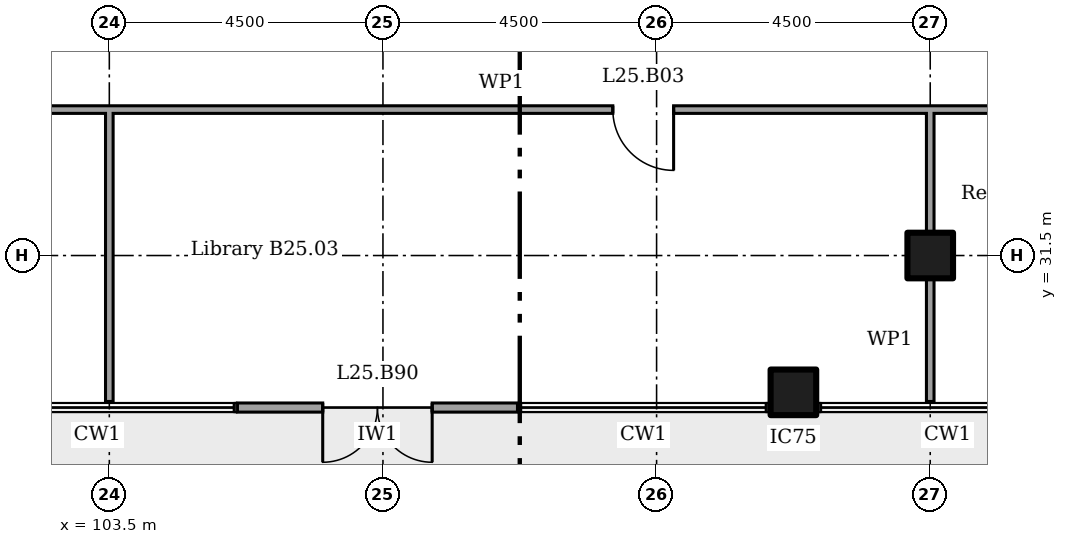
"""IFC4 building model, lengths in metres.
Left out: names, types, materials, properties, quantities, classifications, styles, units other than length and angle.
Written with IfcOpenShell. Run it as: python <this file> out.ifc"""

import sys

from ifc_helpers import new_model, si_unit, direction, frame, frame_2d, origin, origin_2d, place, context, subcontext, project, spatial, rectangle, extrude, element, fill, save


model = new_model("IFC4")
c1 = context("Model", 3, precision=1e-05, world=origin(), true_north=direction((0.0, 1.0)))
c2 = subcontext(c1, "Body", "Model", "MODEL_VIEW")
j1 = project(units=[si_unit("LENGTHUNIT", "METRE"), si_unit("PLANEANGLEUNIT", "RADIAN")], contexts=[c1])
p1 = place(None, origin())
s1 = spatial("IfcSite", under=j1, at=p1, CompositionType="ELEMENT")
p2 = place(p1, origin())
s2 = spatial("IfcBuilding", under=s1, at=p2, CompositionType="ELEMENT")
p3 = place(p2, frame((0.0, 0.0, 102.8)))
s3 = spatial("IfcBuildingStorey", under=s2, at=p3, CompositionType="ELEMENT", Elevation=102.8)
for number, where in (
    (1, (114.75, 29.25, 0.0)),
    (2, (117.0, 31.5, 0.0)),
):
    element("IfcColumn", number, at=place(p3, frame(where)), inside=s3, PredefinedType="COLUMN", context=c2, shape_type="SweptSolid", body=[
        extrude(rectangle(XDim=0.75, YDim=0.75, at=origin_2d()), origin(), (0.0, 0.0, 1.0), 3.6),
    ])
p4 = place(p3, frame((105.606, 29.0, 0.0)))
e3 = element("IfcWall", 3, at=p4, inside=s3, PredefinedType="SOLIDWALL", context=c2, shape_type="SweptSolid", body=[
    extrude(rectangle(XDim=4.606, YDim=0.15, at=frame_2d((2.303, 0.0))), origin(), (0.0, 0.0, 1.0), 3.45),
])
p5 = place(p4, frame((1.403, 0.0, 0.0)))
e4 = element("IfcOpeningElement", 4, at=p5, cuts=e3, PredefinedType="OPENING", context=c2, shape_type="SweptSolid", body=[
    extrude(rectangle(XDim=1.8, YDim=2.4, at=frame_2d((0.9, 1.2))), frame((0.0, 0.085, 0.0), z_axis=(0.0, -1.0, 0.0), x_axis=(1.0, 0.0, 0.0)), (0.0, 0.0, 1.0), 0.17),
])
p6 = place(p3, frame((99.837, 33.9, 0.0)))
e5 = element("IfcWall", 5, at=p6, inside=s3, PredefinedType="PARTITIONING", context=c2, shape_type="SweptSolid", body=[
    extrude(rectangle(XDim=20.225, YDim=0.125, at=frame_2d((10.113, 0.0))), origin(), (0.0, 0.0, 1.0), 3.45),
])
p7 = place(p6, frame((1.47, 0.0, 0.0)))
e6 = element("IfcOpeningElement", 6, at=p7, cuts=e5, PredefinedType="OPENING", context=c2, shape_type="SweptSolid", body=[
    extrude(rectangle(XDim=1.0, YDim=2.1, at=frame_2d((0.5, 1.05))), frame((0.0, 0.073, 0.0), z_axis=(0.0, -1.0, 0.0), x_axis=(1.0, 0.0, 0.0)), (0.0, 0.0, 1.0), 0.145),
])
p8 = place(p6, frame((11.942, 0.0, 0.0)))
e7 = element("IfcOpeningElement", 7, at=p8, cuts=e5, PredefinedType="OPENING", context=c2, shape_type="SweptSolid", body=[
    extrude(rectangle(XDim=1.0, YDim=2.1, at=frame_2d((0.5, 1.05))), frame((0.0, 0.073, 0.0), z_axis=(0.0, -1.0, 0.0), x_axis=(1.0, 0.0, 0.0)), (0.0, 0.0, 1.0), 0.145),
])
p9 = place(p3, frame((103.5, 29.1, 0.0), z_axis=(0.0, 0.0, 1.0), x_axis=(0.0, 1.0, 0.0)))
e8 = element("IfcWall", 8, at=p9, inside=s3, PredefinedType="PARTITIONING", context=c2, shape_type="SweptSolid", body=[
    extrude(rectangle(XDim=4.8, YDim=0.125, at=frame_2d((2.4, 0.0))), origin(), (0.0, 0.0, 1.0), 2.851),
])
for number, where, z_axis, x_axis in (
    (9, (117.0, 29.1, 0.0), (0.0, 0.0, 1.0), (0.0, 1.0, 0.0)),
    (10, (117.0, 31.875, 0.0), (0.0, 0.0, 1.0), (0.0, 1.0, 0.0)),
):
    element("IfcWall", number, at=place(p3, frame(where, z_axis=z_axis, x_axis=x_axis)), inside=s3, PredefinedType="PARTITIONING", context=c2, shape_type="SweptSolid", body=[
        extrude(rectangle(XDim=2.025, YDim=0.125, at=frame_2d((1.012, 0.0))), origin(), (0.0, 0.0, 1.0), 2.842),
    ])
p10 = place(p5, frame((1.8, 0.0, 0.0), x_axis=(-1.0, 0.0, 0.0)))
e11 = element("IfcDoor", 11, at=p10, inside=s3, OperationType="DOUBLE_DOOR_DOUBLE_SWING", PredefinedType="NOTDEFINED", context=c2, shape_type="SweptSolid", body=[
    extrude(rectangle(XDim=1.8, YDim=2.4, at=frame_2d((0.9, 1.2))), frame((0.0, 0.025, 0.0), z_axis=(0.0, -1.0, 0.0), x_axis=(1.0, 0.0, 0.0)), (0.0, 0.0, 1.0), 0.05),
])
fill(e4, e11)
p11 = place(p8, frame((1.0, 0.0, 0.0), x_axis=(-1.0, 0.0, 0.0)))
e12 = element("IfcDoor", 12, at=p11, inside=s3, OperationType="SINGLE_SWING_RIGHT", PredefinedType="DOOR", context=c2, shape_type="SweptSolid", body=[
    extrude(rectangle(XDim=1.0, YDim=2.1, at=frame_2d((0.5, 1.05))), frame((0.0, 0.025, 0.0), z_axis=(0.0, -1.0, 0.0), x_axis=(1.0, 0.0, 0.0)), (0.0, 0.0, 1.0), 0.05),
])
fill(e7, e12)
save(model, sys.argv[1])
